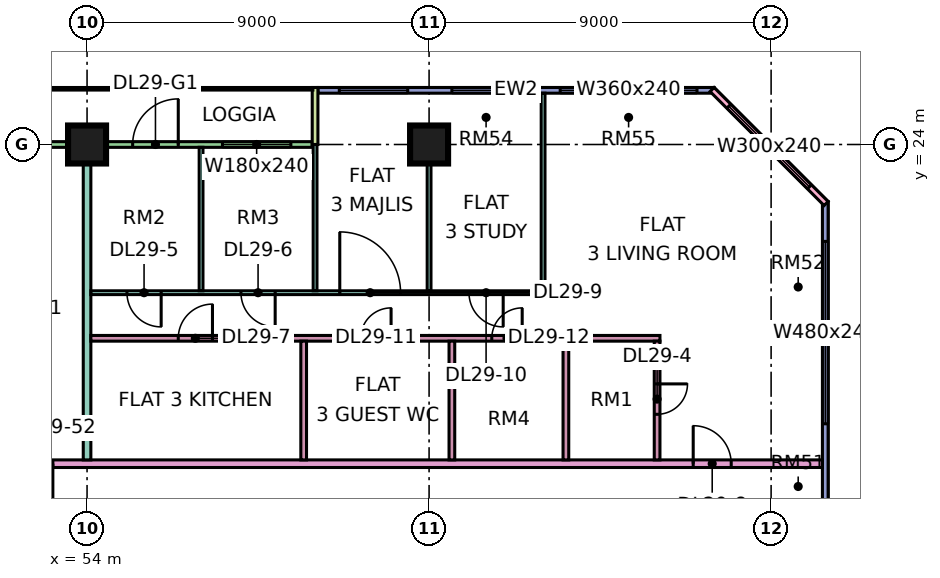
"""IFC4 building model, lengths in metres.
Left out: names, types, materials, properties, quantities, classifications, styles, units other than length and angle.
Written with IfcOpenShell. Run it as: python <this file> out.ifc"""

import sys

from ifc_helpers import new_model, si_unit, direction, frame, frame_2d, origin, origin_2d, place, context, subcontext, project, spatial, rectangle, extrude, element, fill, save


model = new_model("IFC4")
c1 = context("Model", 3, precision=1e-05, world=origin(), true_north=direction((0.0, 1.0)))
c2 = subcontext(c1, "Body", "Model", "MODEL_VIEW")
j1 = project(units=[si_unit("LENGTHUNIT", "METRE"), si_unit("PLANEANGLEUNIT", "RADIAN")], contexts=[c1])
p1 = place(None, origin())
s1 = spatial("IfcSite", under=j1, at=p1, CompositionType="ELEMENT")
p2 = place(p1, origin())
s2 = spatial("IfcBuilding", under=s1, at=p2, CompositionType="ELEMENT")
p3 = place(p2, frame((0.0, 0.0, 125.65)))
s3 = spatial("IfcBuildingStorey", under=s2, at=p3, CompositionType="ELEMENT", Elevation=125.65)
for number, where, z_axis, x_axis in (
    (1, (54.0, 24.0, 0.0), (0.0, 0.0, 1.0), (1.0, 0.0, 0.0)),
    (2, (63.0, 24.0, 0.0), (0.0, 0.0, 1.0), (1.0, 0.0, 0.0)),
):
    element("IfcColumn", number, at=place(p3, frame(where, z_axis=z_axis, x_axis=x_axis)), inside=s3, PredefinedType="COLUMN", context=c2, shape_type="SweptSolid", body=[
        extrude(rectangle(XDim=1.0, YDim=1.0, at=origin_2d()), origin(), (0.0, 0.0, 1.0), 3.75),
    ])
p4 = place(p3, frame((70.5, 25.425, 0.0), z_axis=(0.0, 0.0, 1.0), x_axis=(-1.0, 0.0, 0.0)))
e3 = element("IfcWall", 3, at=p4, inside=s3, PredefinedType="SOLIDWALL", context=c2, shape_type="SweptSolid", body=[
    extrude(rectangle(XDim=10.425, YDim=0.15, at=frame_2d((5.212, 0.0))), origin(), (0.0, 0.0, 1.0), 3.35),
])
p5 = place(p4, frame((0.45, 0.0, 0.45)))
e4 = element("IfcOpeningElement", 4, at=p5, cuts=e3, PredefinedType="OPENING", context=c2, shape_type="SweptSolid", body=[
    extrude(rectangle(XDim=3.6, YDim=2.4, at=frame_2d((1.8, 1.2))), frame((0.0, 0.085, 0.0), z_axis=(0.0, -1.0, 0.0), x_axis=(1.0, 0.0, 0.0)), (0.0, 0.0, 1.0), 0.17),
])
p6 = place(p4, frame((5.1, 0.0, 0.45)))
e5 = element("IfcOpeningElement", 5, at=p6, cuts=e3, PredefinedType="OPENING", context=c2, shape_type="SweptSolid", body=[
    extrude(rectangle(XDim=1.8, YDim=2.4, at=frame_2d((0.9, 1.2))), frame((0.0, 0.085, 0.0), z_axis=(0.0, -1.0, 0.0), x_axis=(1.0, 0.0, 0.0)), (0.0, 0.0, 1.0), 0.17),
])
p7 = place(p4, frame((8.062, 0.0, 0.45)))
e6 = element("IfcOpeningElement", 6, at=p7, cuts=e3, PredefinedType="OPENING", context=c2, shape_type="SweptSolid", body=[
    extrude(rectangle(XDim=1.8, YDim=2.4, at=frame_2d((0.9, 1.2))), frame((0.0, 0.085, 0.0), z_axis=(0.0, -1.0, 0.0), x_axis=(1.0, 0.0, 0.0)), (0.0, 0.0, 1.0), 0.17),
])
p8 = place(p3, frame((59.925, 24.0, 0.0), z_axis=(0.0, 0.0, 1.0), x_axis=(-1.0, 0.0, 0.0)))
e7 = element("IfcWall", 7, at=p8, inside=s3, PredefinedType="SOLIDWALL", context=c2, shape_type="SweptSolid", body=[
    extrude(rectangle(XDim=11.85, YDim=0.15, at=frame_2d((5.925, 0.0))), origin(), (0.0, 0.0, 1.0), 3.35),
])
p9 = place(p8, frame((0.562, 0.0, 0.45)))
e8 = element("IfcOpeningElement", 8, at=p9, cuts=e7, PredefinedType="OPENING", context=c2, shape_type="SweptSolid", body=[
    extrude(rectangle(XDim=1.8, YDim=2.4, at=frame_2d((0.9, 1.2))), frame((0.0, 0.085, 0.0), z_axis=(0.0, -1.0, 0.0), x_axis=(1.0, 0.0, 0.0)), (0.0, 0.0, 1.0), 0.17),
])
p10 = place(p8, frame((3.525, 0.0, 0.0)))
e9 = element("IfcOpeningElement", 9, at=p10, cuts=e7, PredefinedType="OPENING", context=c2, shape_type="SweptSolid", body=[
    extrude(rectangle(XDim=1.2, YDim=2.4, at=frame_2d((0.6, 1.2))), frame((0.0, 0.085, 0.0), z_axis=(0.0, -1.0, 0.0), x_axis=(1.0, 0.0, 0.0)), (0.0, 0.0, 1.0), 0.17),
])
p11 = place(p8, frame((7.087, 0.0, 0.45)))
e10 = element("IfcOpeningElement", 10, at=p11, cuts=e7, PredefinedType="OPENING", context=c2, shape_type="SweptSolid", body=[
    extrude(rectangle(XDim=4.2, YDim=2.4, at=frame_2d((2.1, 1.2))), frame((0.0, 0.085, 0.0), z_axis=(0.0, -1.0, 0.0), x_axis=(1.0, 0.0, 0.0)), (0.0, 0.0, 1.0), 0.17),
])
p12 = place(p3, frame((60.0, 25.5, 0.0), z_axis=(0.0, 0.0, 1.0), x_axis=(0.0, -1.0, 0.0)))
e11 = element("IfcWall", 11, at=p12, inside=s3, PredefinedType="SOLIDWALL", context=c2, shape_type="SweptSolid", body=[
    extrude(rectangle(XDim=1.5, YDim=0.15, at=frame_2d((0.75, 0.0))), origin(), (0.0, 0.0, 1.0), 3.35),
])
p13 = place(p3, frame((73.425, 12.075, 0.0), z_axis=(0.0, 0.0, 1.0), x_axis=(0.0, 1.0, 0.0)))
e12 = element("IfcWall", 12, at=p13, inside=s3, PredefinedType="SOLIDWALL", context=c2, shape_type="SweptSolid", body=[
    extrude(rectangle(XDim=10.425, YDim=0.15, at=frame_2d((5.212, 0.0))), origin(), (0.0, 0.0, 1.0), 3.35),
])
p14 = place(p13, frame((4.575, 0.0, 0.45)))
e13 = element("IfcOpeningElement", 13, at=p14, cuts=e12, PredefinedType="OPENING", context=c2, shape_type="SweptSolid", body=[
    extrude(rectangle(XDim=4.8, YDim=2.4, at=frame_2d((2.4, 1.2))), frame((0.0, 0.085, 0.0), z_axis=(0.0, -1.0, 0.0), x_axis=(1.0, 0.0, 0.0)), (0.0, 0.0, 1.0), 0.17),
])
p15 = place(p3, frame((73.447, 22.447, 0.0), z_axis=(0.0, 0.0, 1.0), x_axis=(-0.707106781187, 0.707106781187, 0.0)))
e14 = element("IfcWall", 14, at=p15, inside=s3, PredefinedType="SOLIDWALL", context=c2, shape_type="SweptSolid", body=[
    extrude(rectangle(XDim=4.243, YDim=0.15, at=frame_2d((2.121, 0.0))), origin(), (0.0, 0.0, 1.0), 3.35),
])
p16 = place(p15, frame((0.621, 0.0, 0.45)))
e15 = element("IfcOpeningElement", 15, at=p16, cuts=e14, PredefinedType="OPENING", context=c2, shape_type="SweptSolid", body=[
    extrude(rectangle(XDim=3.0, YDim=2.4, at=frame_2d((1.5, 1.2))), frame((0.0, 0.085, 0.0), z_axis=(0.0, -1.0, 0.0), x_axis=(1.0, 0.0, 0.0)), (0.0, 0.0, 1.0), 0.17),
])
p17 = place(p3, frame((51.225, 15.6, 0.0), z_axis=(0.0, 0.0, 1.0), x_axis=(1.0, 0.0, 0.0)))
e16 = element("IfcWall", 16, at=p17, inside=s3, PredefinedType="PARTITIONING", context=c2, shape_type="SweptSolid", body=[
    extrude(rectangle(XDim=22.125, YDim=0.2, at=frame_2d((11.062, 0.0))), origin(), (0.0, 0.0, 1.0), 3.35),
])
p18 = place(p17, frame((18.725, 0.0, 0.0)))
e17 = element("IfcOpeningElement", 17, at=p18, cuts=e16, PredefinedType="OPENING", context=c2, shape_type="SweptSolid", body=[
    extrude(rectangle(XDim=1.0, YDim=2.1, at=frame_2d((0.5, 1.05))), frame((0.0, 0.11, 0.0), z_axis=(0.0, -1.0, 0.0), x_axis=(1.0, 0.0, 0.0)), (0.0, 0.0, 1.0), 0.22),
])
p19 = place(p17, frame((0.875, 0.0, 0.0)))
e18 = element("IfcOpeningElement", 18, at=p19, cuts=e16, PredefinedType="OPENING", context=c2, shape_type="SweptSolid", body=[
    extrude(rectangle(XDim=1.0, YDim=2.1, at=frame_2d((0.5, 1.05))), frame((0.0, 0.11, 0.0), z_axis=(0.0, -1.0, 0.0), x_axis=(1.0, 0.0, 0.0)), (0.0, 0.0, 1.0), 0.22),
])
p20 = place(p3, frame((54.0, 15.7, 0.0), z_axis=(0.0, 0.0, 1.0), x_axis=(0.0, 1.0, 0.0)))
e19 = element("IfcWall", 19, at=p20, inside=s3, PredefinedType="PARTITIONING", context=c2, shape_type="SweptSolid", body=[
    extrude(rectangle(XDim=8.226, YDim=0.2, at=frame_2d((4.113, 0.0))), origin(), (0.0, 0.0, 1.0), 3.35),
])
p21 = place(p3, frame((54.1, 18.9, 0.0), z_axis=(0.0, 0.0, 1.0), x_axis=(1.0, 0.0, 0.0)))
e20 = element("IfcWall", 20, at=p21, inside=s3, PredefinedType="PARTITIONING", context=c2, shape_type="SweptSolid", body=[
    extrude(rectangle(XDim=14.975, YDim=0.15, at=frame_2d((7.487, 0.0))), origin(), (0.0, 0.0, 1.0), 3.35),
])
p22 = place(p21, frame((2.3, 0.0, 0.0)))
e21 = element("IfcOpeningElement", 21, at=p22, cuts=e20, PredefinedType="OPENING", context=c2, shape_type="SweptSolid", body=[
    extrude(rectangle(XDim=0.9, YDim=2.1, at=frame_2d((0.45, 1.05))), frame((0.0, 0.085, 0.0), z_axis=(0.0, -1.0, 0.0), x_axis=(1.0, 0.0, 0.0)), (0.0, 0.0, 1.0), 0.17),
])
p23 = place(p21, frame((7.1, 0.0, 0.0)))
e22 = element("IfcOpeningElement", 22, at=p23, cuts=e20, PredefinedType="OPENING", context=c2, shape_type="SweptSolid", body=[
    extrude(rectangle(XDim=0.8, YDim=2.1, at=frame_2d((0.4, 1.05))), frame((0.0, 0.085, 0.0), z_axis=(0.0, -1.0, 0.0), x_axis=(1.0, 0.0, 0.0)), (0.0, 0.0, 1.0), 0.17),
])
p24 = place(p21, frame((10.55, 0.0, 0.0)))
e23 = element("IfcOpeningElement", 23, at=p24, cuts=e20, PredefinedType="OPENING", context=c2, shape_type="SweptSolid", body=[
    extrude(rectangle(XDim=0.8, YDim=2.1, at=frame_2d((0.4, 1.05))), frame((0.0, 0.085, 0.0), z_axis=(0.0, -1.0, 0.0), x_axis=(1.0, 0.0, 0.0)), (0.0, 0.0, 1.0), 0.17),
])
p25 = place(p3, frame((54.1, 20.1, 0.0), z_axis=(0.0, 0.0, 1.0), x_axis=(1.0, 0.0, 0.0)))
e24 = element("IfcWall", 24, at=p25, inside=s3, PredefinedType="PARTITIONING", context=c2, shape_type="SweptSolid", body=[
    extrude(rectangle(XDim=11.95, YDim=0.1, at=frame_2d((5.975, 0.0))), origin(), (0.0, 0.0, 1.0), 3.35),
])
p26 = place(p25, frame((0.95, 0.0, 0.0)))
e25 = element("IfcOpeningElement", 25, at=p26, cuts=e24, PredefinedType="OPENING", context=c2, shape_type="SweptSolid", body=[
    extrude(rectangle(XDim=0.9, YDim=2.1, at=frame_2d((0.45, 1.05))), frame((0.0, 0.06, 0.0), z_axis=(0.0, -1.0, 0.0), x_axis=(1.0, 0.0, 0.0)), (0.0, 0.0, 1.0), 0.12),
])
p27 = place(p25, frame((3.95, 0.0, 0.0)))
e26 = element("IfcOpeningElement", 26, at=p27, cuts=e24, PredefinedType="OPENING", context=c2, shape_type="SweptSolid", body=[
    extrude(rectangle(XDim=0.9, YDim=2.1, at=frame_2d((0.45, 1.05))), frame((0.0, 0.06, 0.0), z_axis=(0.0, -1.0, 0.0), x_axis=(1.0, 0.0, 0.0)), (0.0, 0.0, 1.0), 0.12),
])
p28 = place(p25, frame((6.55, 0.0, 0.0)))
e27 = element("IfcOpeningElement", 27, at=p28, cuts=e24, PredefinedType="OPENING", context=c2, shape_type="SweptSolid", body=[
    extrude(rectangle(XDim=1.6, YDim=2.1, at=frame_2d((0.8, 1.05))), frame((0.0, 0.06, 0.0), z_axis=(0.0, -1.0, 0.0), x_axis=(1.0, 0.0, 0.0)), (0.0, 0.0, 1.0), 0.12),
])
p29 = place(p25, frame((9.95, 0.0, 0.0)))
e28 = element("IfcOpeningElement", 28, at=p29, cuts=e24, PredefinedType="OPENING", context=c2, shape_type="SweptSolid", body=[
    extrude(rectangle(XDim=0.9, YDim=2.1, at=frame_2d((0.45, 1.05))), frame((0.0, 0.06, 0.0), z_axis=(0.0, -1.0, 0.0), x_axis=(1.0, 0.0, 0.0)), (0.0, 0.0, 1.0), 0.12),
])
p30 = place(p3, frame((57.0, 20.15, 0.0), z_axis=(0.0, 0.0, 1.0), x_axis=(0.0, 1.0, 0.0)))
e29 = element("IfcWall", 29, at=p30, inside=s3, PredefinedType="PARTITIONING", context=c2, shape_type="SweptSolid", body=[
    extrude(rectangle(XDim=3.776, YDim=0.1, at=frame_2d((1.888, 0.0))), origin(), (0.0, 0.0, 1.0), 3.35),
])
p31 = place(p3, frame((59.7, 15.7, 0.0), z_axis=(0.0, 0.0, 1.0), x_axis=(0.0, 1.0, 0.0)))
e30 = element("IfcWall", 30, at=p31, inside=s3, PredefinedType="PARTITIONING", context=c2, shape_type="SweptSolid", body=[
    extrude(rectangle(XDim=3.125, YDim=0.15, at=frame_2d((1.562, 0.0))), origin(), (0.0, 0.0, 1.0), 3.35),
])
for number, where, z_axis, x_axis in (
    (31, (60.0, 20.15, 0.0), (0.0, 0.0, 1.0), (0.0, 1.0, 0.0)),
    (32, (63.0, 20.15, 0.0), (0.0, 0.0, 1.0), (0.0, 1.0, 0.0)),
):
    element("IfcWall", number, at=place(p3, frame(where, z_axis=z_axis, x_axis=x_axis)), inside=s3, PredefinedType="PARTITIONING", context=c2, shape_type="SweptSolid", body=[
        extrude(rectangle(XDim=3.85, YDim=0.1, at=frame_2d((1.925, 0.0))), origin(), (0.0, 0.0, 1.0), 3.35),
    ])
p32 = place(p3, frame((63.6, 15.7, 0.0), z_axis=(0.0, 0.0, 1.0), x_axis=(0.0, 1.0, 0.0)))
e33 = element("IfcWall", 33, at=p32, inside=s3, PredefinedType="PARTITIONING", context=c2, shape_type="SweptSolid", body=[
    extrude(rectangle(XDim=3.125, YDim=0.15, at=frame_2d((1.562, 0.0))), origin(), (0.0, 0.0, 1.0), 3.35),
])
p33 = place(p3, frame((66.0, 20.15, 0.0), z_axis=(0.0, 0.0, 1.0), x_axis=(0.0, 1.0, 0.0)))
e34 = element("IfcWall", 34, at=p33, inside=s3, PredefinedType="PARTITIONING", context=c2, shape_type="SweptSolid", body=[
    extrude(rectangle(XDim=5.2, YDim=0.1, at=frame_2d((2.6, 0.0))), origin(), (0.0, 0.0, 1.0), 3.35),
])
p34 = place(p3, frame((66.6, 15.7, 0.0), z_axis=(0.0, 0.0, 1.0), x_axis=(0.0, 1.0, 0.0)))
e35 = element("IfcWall", 35, at=p34, inside=s3, PredefinedType="PARTITIONING", context=c2, shape_type="SweptSolid", body=[
    extrude(rectangle(XDim=3.125, YDim=0.15, at=frame_2d((1.562, 0.0))), origin(), (0.0, 0.0, 1.0), 3.35),
])
p35 = place(p3, frame((69.0, 15.7, 0.0), z_axis=(0.0, 0.0, 1.0), x_axis=(0.0, 1.0, 0.0)))
e36 = element("IfcWall", 36, at=p35, inside=s3, PredefinedType="PARTITIONING", context=c2, shape_type="SweptSolid", body=[
    extrude(rectangle(XDim=3.125, YDim=0.15, at=frame_2d((1.562, 0.0))), origin(), (0.0, 0.0, 1.0), 3.35),
])
p36 = place(p35, frame((1.2, 0.0, 0.0)))
e37 = element("IfcOpeningElement", 37, at=p36, cuts=e36, PredefinedType="OPENING", context=c2, shape_type="SweptSolid", body=[
    extrude(rectangle(XDim=0.8, YDim=2.1, at=frame_2d((0.4, 1.05))), frame((0.0, 0.085, 0.0), z_axis=(0.0, -1.0, 0.0), x_axis=(1.0, 0.0, 0.0)), (0.0, 0.0, 1.0), 0.17),
])
p37 = place(p5, origin())
e38 = element("IfcWindow", 38, at=p37, inside=s3, PartitioningType="SINGLE_PANEL", PredefinedType="WINDOW", context=c2, shape_type="SweptSolid", body=[
    extrude(rectangle(XDim=3.6, YDim=2.4, at=frame_2d((1.8, 1.2))), frame((0.0, 0.03, 0.0), z_axis=(0.0, -1.0, 0.0), x_axis=(1.0, 0.0, 0.0)), (0.0, 0.0, 1.0), 0.06),
])
fill(e4, e38)
p38 = place(p6, origin())
e39 = element("IfcWindow", 39, at=p38, inside=s3, PartitioningType="SINGLE_PANEL", PredefinedType="WINDOW", context=c2, shape_type="SweptSolid", body=[
    extrude(rectangle(XDim=1.8, YDim=2.4, at=frame_2d((0.9, 1.2))), frame((0.0, 0.03, 0.0), z_axis=(0.0, -1.0, 0.0), x_axis=(1.0, 0.0, 0.0)), (0.0, 0.0, 1.0), 0.06),
])
fill(e5, e39)
p39 = place(p7, origin())
e40 = element("IfcWindow", 40, at=p39, inside=s3, PartitioningType="SINGLE_PANEL", PredefinedType="WINDOW", context=c2, shape_type="SweptSolid", body=[
    extrude(rectangle(XDim=1.8, YDim=2.4, at=frame_2d((0.9, 1.2))), frame((0.0, 0.03, 0.0), z_axis=(0.0, -1.0, 0.0), x_axis=(1.0, 0.0, 0.0)), (0.0, 0.0, 1.0), 0.06),
])
fill(e6, e40)
p40 = place(p9, origin())
e41 = element("IfcWindow", 41, at=p40, inside=s3, PartitioningType="SINGLE_PANEL", PredefinedType="WINDOW", context=c2, shape_type="SweptSolid", body=[
    extrude(rectangle(XDim=1.8, YDim=2.4, at=frame_2d((0.9, 1.2))), frame((0.0, 0.03, 0.0), z_axis=(0.0, -1.0, 0.0), x_axis=(1.0, 0.0, 0.0)), (0.0, 0.0, 1.0), 0.06),
])
fill(e8, e41)
p41 = place(p10, frame((1.2, 0.0, 0.0), z_axis=(0.0, 0.0, 1.0), x_axis=(-1.0, 0.0, 0.0)))
e42 = element("IfcDoor", 42, at=p41, inside=s3, OperationType="DOUBLE_DOOR_SINGLE_SWING", PredefinedType="DOOR", context=c2, shape_type="SweptSolid", body=[
    extrude(rectangle(XDim=1.2, YDim=2.4, at=frame_2d((0.6, 1.2))), frame((0.0, 0.025, 0.0), z_axis=(0.0, -1.0, 0.0), x_axis=(1.0, 0.0, 0.0)), (0.0, 0.0, 1.0), 0.05),
])
fill(e9, e42)
p42 = place(p14, origin())
e43 = element("IfcWindow", 43, at=p42, inside=s3, PartitioningType="SINGLE_PANEL", PredefinedType="WINDOW", context=c2, shape_type="SweptSolid", body=[
    extrude(rectangle(XDim=4.8, YDim=2.4, at=frame_2d((2.4, 1.2))), frame((0.0, 0.03, 0.0), z_axis=(0.0, -1.0, 0.0), x_axis=(1.0, 0.0, 0.0)), (0.0, 0.0, 1.0), 0.06),
])
fill(e13, e43)
p43 = place(p16, origin())
e44 = element("IfcWindow", 44, at=p43, inside=s3, PartitioningType="SINGLE_PANEL", PredefinedType="WINDOW", context=c2, shape_type="SweptSolid", body=[
    extrude(rectangle(XDim=3.0, YDim=2.4, at=frame_2d((1.5, 1.2))), frame((0.0, 0.03, 0.0), z_axis=(0.0, -1.0, 0.0), x_axis=(1.0, 0.0, 0.0)), (0.0, 0.0, 1.0), 0.06),
])
fill(e15, e44)
p44 = place(p36, origin())
e45 = element("IfcDoor", 45, at=p44, inside=s3, OperationType="SINGLE_SWING_RIGHT", PredefinedType="DOOR", context=c2, shape_type="SweptSolid", body=[
    extrude(rectangle(XDim=0.8, YDim=2.1, at=frame_2d((0.4, 1.05))), frame((0.0, 0.025, 0.0), z_axis=(0.0, -1.0, 0.0), x_axis=(1.0, 0.0, 0.0)), (0.0, 0.0, 1.0), 0.05),
])
fill(e37, e45)
p45 = place(p26, origin())
e46 = element("IfcDoor", 46, at=p45, inside=s3, OperationType="SINGLE_SWING_RIGHT", PredefinedType="DOOR", context=c2, shape_type="SweptSolid", body=[
    extrude(rectangle(XDim=0.9, YDim=2.1, at=frame_2d((0.45, 1.05))), frame((0.0, 0.025, 0.0), z_axis=(0.0, -1.0, 0.0), x_axis=(1.0, 0.0, 0.0)), (0.0, 0.0, 1.0), 0.05),
])
fill(e25, e46)
p46 = place(p27, origin())
e47 = element("IfcDoor", 47, at=p46, inside=s3, OperationType="SINGLE_SWING_RIGHT", PredefinedType="DOOR", context=c2, shape_type="SweptSolid", body=[
    extrude(rectangle(XDim=0.9, YDim=2.1, at=frame_2d((0.45, 1.05))), frame((0.0, 0.025, 0.0), z_axis=(0.0, -1.0, 0.0), x_axis=(1.0, 0.0, 0.0)), (0.0, 0.0, 1.0), 0.05),
])
fill(e26, e47)
p47 = place(p22, frame((0.9, 0.0, 0.0), z_axis=(0.0, 0.0, 1.0), x_axis=(-1.0, 0.0, 0.0)))
e48 = element("IfcDoor", 48, at=p47, inside=s3, OperationType="SINGLE_SWING_RIGHT", PredefinedType="DOOR", context=c2, shape_type="SweptSolid", body=[
    extrude(rectangle(XDim=0.9, YDim=2.1, at=frame_2d((0.45, 1.05))), frame((0.0, 0.025, 0.0), z_axis=(0.0, -1.0, 0.0), x_axis=(1.0, 0.0, 0.0)), (0.0, 0.0, 1.0), 0.05),
])
fill(e21, e48)
p48 = place(p18, origin())
e49 = element("IfcDoor", 49, at=p48, inside=s3, OperationType="SINGLE_SWING_LEFT", PredefinedType="DOOR", context=c2, shape_type="SweptSolid", body=[
    extrude(rectangle(XDim=1.0, YDim=2.1, at=frame_2d((0.5, 1.05))), frame((0.0, 0.025, 0.0), z_axis=(0.0, -1.0, 0.0), x_axis=(1.0, 0.0, 0.0)), (0.0, 0.0, 1.0), 0.05),
])
fill(e17, e49)
p49 = place(p28, origin())
e50 = element("IfcDoor", 50, at=p49, inside=s3, OperationType="DOUBLE_DOOR_SINGLE_SWING", PredefinedType="DOOR", context=c2, shape_type="SweptSolid", body=[
    extrude(rectangle(XDim=1.6, YDim=2.1, at=frame_2d((0.8, 1.05))), frame((0.0, 0.025, 0.0), z_axis=(0.0, -1.0, 0.0), x_axis=(1.0, 0.0, 0.0)), (0.0, 0.0, 1.0), 0.05),
])
fill(e27, e50)
p50 = place(p29, origin())
e51 = element("IfcDoor", 51, at=p50, inside=s3, OperationType="SINGLE_SWING_RIGHT", PredefinedType="DOOR", context=c2, shape_type="SweptSolid", body=[
    extrude(rectangle(XDim=0.9, YDim=2.1, at=frame_2d((0.45, 1.05))), frame((0.0, 0.025, 0.0), z_axis=(0.0, -1.0, 0.0), x_axis=(1.0, 0.0, 0.0)), (0.0, 0.0, 1.0), 0.05),
])
fill(e28, e51)
p51 = place(p23, frame((0.8, 0.0, 0.0), z_axis=(0.0, 0.0, 1.0), x_axis=(-1.0, 0.0, 0.0)))
e52 = element("IfcDoor", 52, at=p51, inside=s3, OperationType="SINGLE_SWING_RIGHT", PredefinedType="DOOR", context=c2, shape_type="SweptSolid", body=[
    extrude(rectangle(XDim=0.8, YDim=2.1, at=frame_2d((0.4, 1.05))), frame((0.0, 0.025, 0.0), z_axis=(0.0, -1.0, 0.0), x_axis=(1.0, 0.0, 0.0)), (0.0, 0.0, 1.0), 0.05),
])
fill(e22, e52)
p52 = place(p24, frame((0.8, 0.0, 0.0), z_axis=(0.0, 0.0, 1.0), x_axis=(-1.0, 0.0, 0.0)))
e53 = element("IfcDoor", 53, at=p52, inside=s3, OperationType="SINGLE_SWING_RIGHT", PredefinedType="DOOR", context=c2, shape_type="SweptSolid", body=[
    extrude(rectangle(XDim=0.8, YDim=2.1, at=frame_2d((0.4, 1.05))), frame((0.0, 0.025, 0.0), z_axis=(0.0, -1.0, 0.0), x_axis=(1.0, 0.0, 0.0)), (0.0, 0.0, 1.0), 0.05),
])
fill(e23, e53)
p53 = place(p19, origin())
e54 = element("IfcDoor", 54, at=p53, inside=s3, OperationType="SINGLE_SWING_RIGHT", PredefinedType="DOOR", context=c2, shape_type="SweptSolid", body=[
    extrude(rectangle(XDim=1.0, YDim=2.1, at=frame_2d((0.5, 1.05))), frame((0.0, 0.025, 0.0), z_axis=(0.0, -1.0, 0.0), x_axis=(1.0, 0.0, 0.0)), (0.0, 0.0, 1.0), 0.05),
])
fill(e18, e54)
save(model, sys.argv[1])
